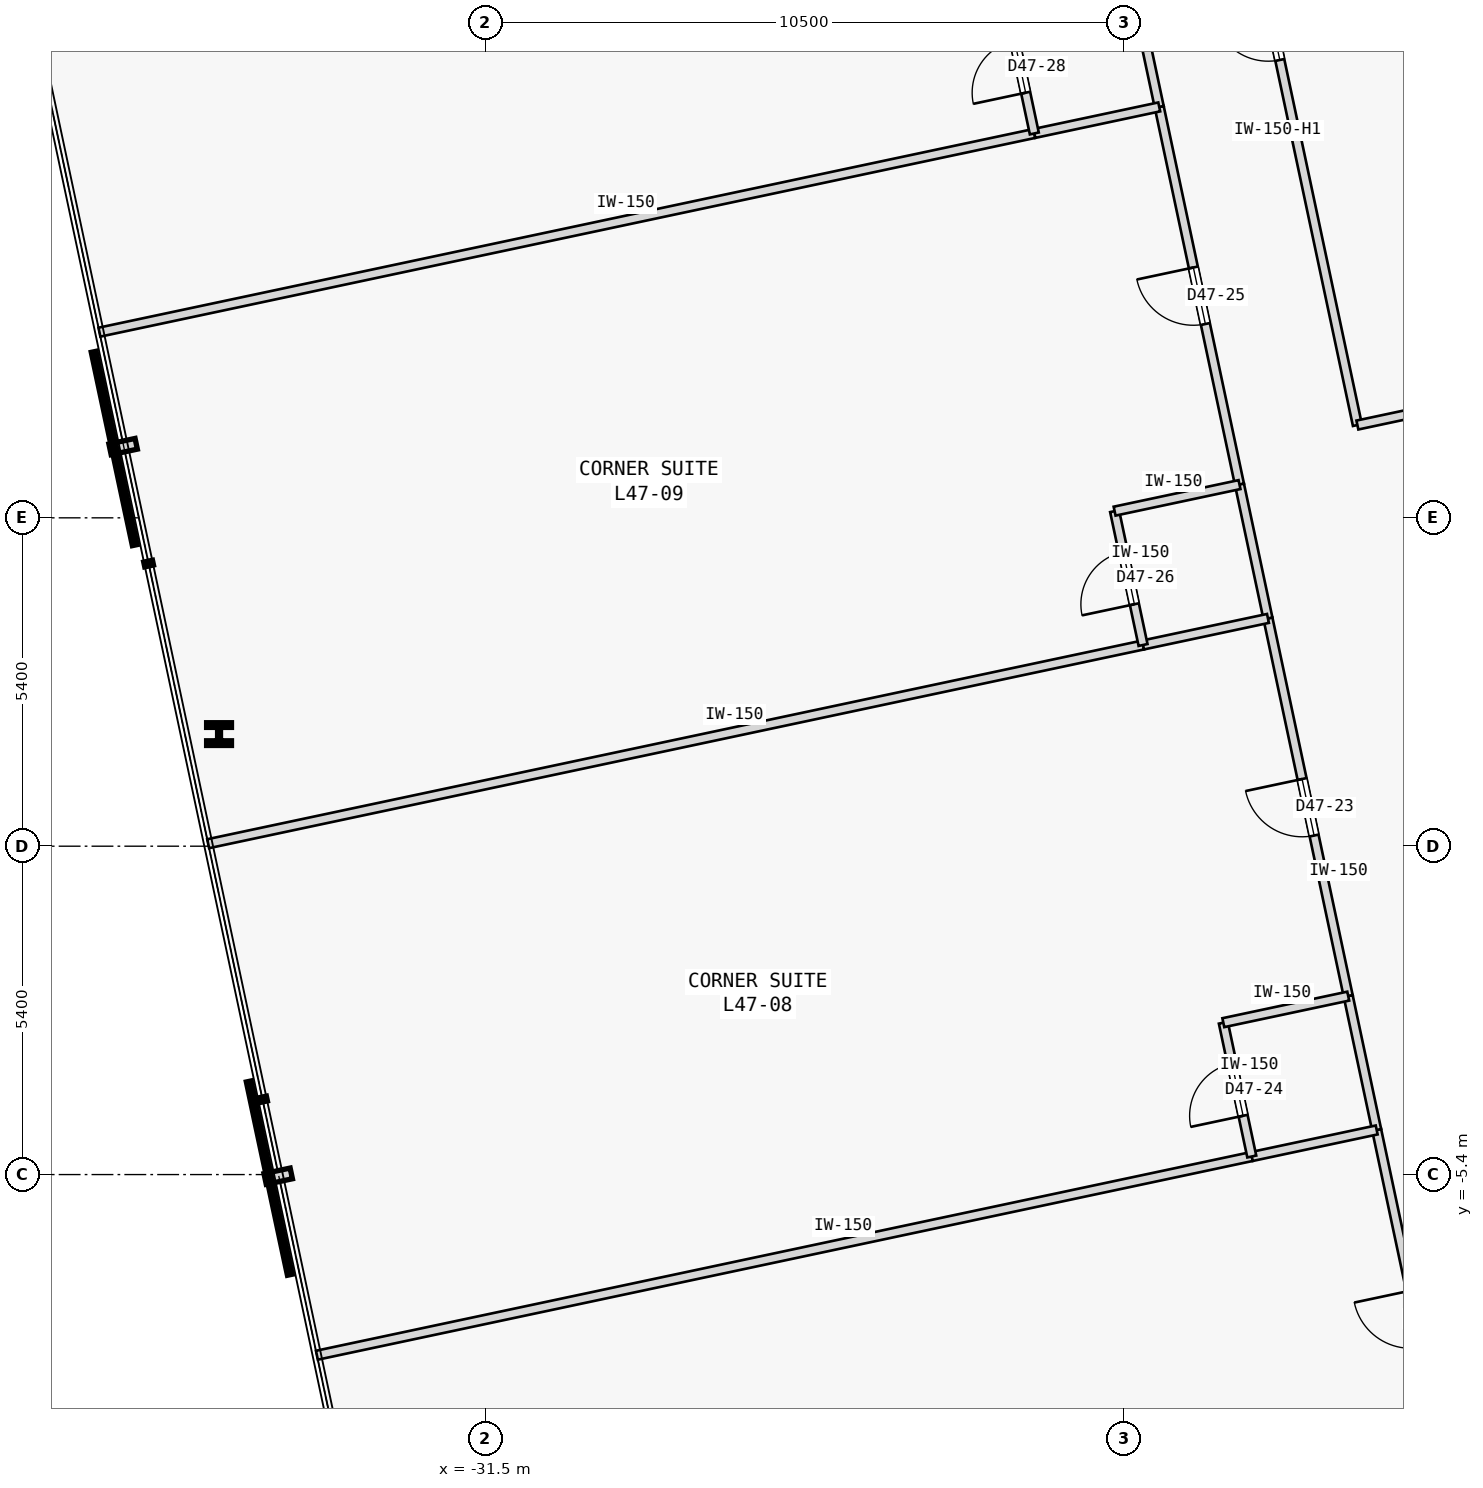
"""IFC4 building model, lengths in metres.
Left out: names, types, materials, properties, quantities, classifications, styles, units other than length and angle.
Written with IfcOpenShell. Run it as: python <this file> out.ifc"""

import sys

from ifc_helpers import new_model, si_unit, direction, frame, frame_2d, origin, origin_2d, place, context, subcontext, project, spatial, rectangle, i_section, extrude, element, fill, save


model = new_model("IFC4")
c1 = context("Model", 3, precision=1e-05, world=origin(), true_north=direction((0.0, 1.0)))
c2 = subcontext(c1, "Body", "Model", "MODEL_VIEW")
j1 = project(units=[si_unit("LENGTHUNIT", "METRE"), si_unit("PLANEANGLEUNIT", "RADIAN")], contexts=[c1])
p1 = place(None, origin())
s1 = spatial("IfcSite", under=j1, at=p1, CompositionType="ELEMENT")
p2 = place(p1, origin())
s2 = spatial("IfcBuilding", under=s1, at=p2, CompositionType="ELEMENT")
p3 = place(p2, frame((0.0, 0.0, 182.0)))
s3 = spatial("IfcBuildingStorey", under=s2, at=p3, CompositionType="ELEMENT", Elevation=182.0)
p4 = place(p3, frame((-35.883, 1.844, 0.0), z_axis=(0.0, 0.0, 1.0), x_axis=(1.0, 0.0, 0.0)))
e1 = element("IfcColumn", 1, at=p4, inside=s3, PredefinedType="COLUMN", context=c2, shape_type="SweptSolid", body=[
    extrude(i_section(OverallWidth=0.409, OverallDepth=0.374, WebThickness=0.048, FlangeThickness=0.077, FilletRadius=0.015, at=origin_2d()), origin(), (0.0, 0.0, 1.0), 3.4),
])
p5 = place(p3, frame((-17.162, 6.926, 0.0), z_axis=(0.0, 0.0, 1.0), x_axis=(-0.207911421929, 0.978147657888, 0.0)))
e2 = element("IfcWall", 2, at=p5, inside=s3, PredefinedType="PARTITIONING", context=c2, shape_type="SweptSolid", body=[
    extrude(rectangle(XDim=13.195, YDim=0.15, at=frame_2d((6.598, 0.0))), origin(), (0.0, 0.0, 1.0), 2.725),
])
p6 = place(p5, frame((6.137, 0.0, 0.0)))
e3 = element("IfcOpeningElement", 3, at=p6, cuts=e2, PredefinedType="OPENING", context=c2, shape_type="SweptSolid", body=[
    extrude(rectangle(XDim=0.92, YDim=2.15, at=frame_2d((0.46, 1.075))), frame((0.0, 0.085, 0.0), z_axis=(0.0, -1.0, 0.0), x_axis=(1.0, 0.0, 0.0)), (0.0, 0.0, 1.0), 0.17),
])
p7 = place(p3, frame((-17.162, 6.926, 0.0), z_axis=(0.0, 0.0, 1.0), x_axis=(0.978144196583, 0.207927705443, 0.0)))
e4 = element("IfcWall", 4, at=p7, inside=s3, PredefinedType="PARTITIONING", context=c2, shape_type="SweptSolid", body=[
    extrude(rectangle(XDim=5.717, YDim=0.15, at=frame_2d((2.858, 0.0))), origin(), (0.0, 0.0, 1.0), 3.175),
])
p8 = place(p3, frame((-15.525, -10.878, 0.0), z_axis=(0.0, 0.0, 1.0), x_axis=(-0.207887725283, 0.978152694459, 0.0)))
e5 = element("IfcWall", 5, at=p8, inside=s3, PredefinedType="PARTITIONING", context=c2, shape_type="SweptSolid", body=[
    extrude(rectangle(XDim=6.35, YDim=0.15, at=frame_2d((3.175, 0.0))), origin(), (0.0, 0.0, 1.0), 3.175),
])
p9 = place(p8, frame((2.7, 0.0, 0.0)))
e6 = element("IfcOpeningElement", 6, at=p9, cuts=e5, PredefinedType="OPENING", context=c2, shape_type="SweptSolid", body=[
    extrude(rectangle(XDim=0.95, YDim=2.15, at=frame_2d((0.475, 1.075))), frame((0.0, 0.085, 0.0), z_axis=(0.0, -1.0, 0.0), x_axis=(1.0, 0.0, 0.0)), (0.0, 0.0, 1.0), 0.17),
])
p10 = place(p3, frame((-17.313, -2.466, 0.0), z_axis=(0.0, 0.0, 1.0), x_axis=(-0.207916691923, 0.978146537703, 0.0)))
e7 = element("IfcWall", 7, at=p10, inside=s3, PredefinedType="PARTITIONING", context=c2, shape_type="SweptSolid", body=[
    extrude(rectangle(XDim=6.35, YDim=0.15, at=frame_2d((3.175, 0.0))), origin(), (0.0, 0.0, 1.0), 3.175),
])
p11 = place(p10, frame((2.7, 0.0, 0.0)))
e8 = element("IfcOpeningElement", 8, at=p11, cuts=e7, PredefinedType="OPENING", context=c2, shape_type="SweptSolid", body=[
    extrude(rectangle(XDim=0.95, YDim=2.15, at=frame_2d((0.475, 1.075))), frame((0.0, 0.085, 0.0), z_axis=(0.0, -1.0, 0.0), x_axis=(1.0, 0.0, 0.0)), (0.0, 0.0, 1.0), 0.17),
])
p12 = place(p3, frame((-16.845, -4.667, 0.0), z_axis=(0.0, 0.0, 1.0), x_axis=(-0.207913264065, 0.978147266328, 0.0)))
e9 = element("IfcWall", 9, at=p12, inside=s3, PredefinedType="PARTITIONING", context=c2, shape_type="SweptSolid", body=[
    extrude(rectangle(XDim=2.25, YDim=0.15, at=frame_2d((1.125, 0.0))), origin(), (0.0, 0.0, 1.0), 3.175),
])
p13 = place(p3, frame((-19.101, 5.946, 0.0), z_axis=(0.0, 0.0, 1.0), x_axis=(-0.207916691923, 0.978146537703, 0.0)))
e10 = element("IfcWall", 10, at=p13, inside=s3, PredefinedType="PARTITIONING", context=c2, shape_type="SweptSolid", body=[
    extrude(rectangle(XDim=6.35, YDim=0.15, at=frame_2d((3.175, 0.0))), origin(), (0.0, 0.0, 1.0), 3.175),
])
p14 = place(p13, frame((2.7, 0.0, 0.0)))
e11 = element("IfcOpeningElement", 11, at=p14, cuts=e10, PredefinedType="OPENING", context=c2, shape_type="SweptSolid", body=[
    extrude(rectangle(XDim=0.95, YDim=2.15, at=frame_2d((0.475, 1.075))), frame((0.0, 0.085, 0.0), z_axis=(0.0, -1.0, 0.0), x_axis=(1.0, 0.0, 0.0)), (0.0, 0.0, 1.0), 0.17),
])
for number, where, z_axis, x_axis in (
    (12, (-18.633, 3.746, 0.0), (0.0, 0.0, 1.0), (-0.208, 0.978, 0.0)),
    (13, (-20.421, 12.158, 0.0), (0.0, 0.0, 1.0), (-0.208, 0.978, 0.0)),
):
    element("IfcWall", number, at=place(p3, frame(where, z_axis=z_axis, x_axis=x_axis)), inside=s3, PredefinedType="PARTITIONING", context=c2, shape_type="SweptSolid", body=[
        extrude(rectangle(XDim=2.25, YDim=0.15, at=frame_2d((1.125, 0.0))), origin(), (0.0, 0.0, 1.0), 3.175),
    ])
p15 = place(p3, frame((-34.274, -8.371, 0.0), z_axis=(0.0, 0.0, 1.0), x_axis=(0.978146137903, 0.207918572776, 0.0)))
e14 = element("IfcWall", 14, at=p15, inside=s3, PredefinedType="PARTITIONING", context=c2, shape_type="SweptSolid", body=[
    extrude(rectangle(XDim=15.718, YDim=0.15, at=frame_2d((7.859, 0.0))), origin(), (0.0, 0.0, 1.0), 3.175),
])
p16 = place(p3, frame((-18.899, -5.103, 0.0), z_axis=(0.0, 0.0, 1.0), x_axis=(0.97815826, 0.207861536591, 0.0)))
e15 = element("IfcWall", 15, at=p16, inside=s3, PredefinedType="PARTITIONING", context=c2, shape_type="SweptSolid", body=[
    extrude(rectangle(XDim=2.1, YDim=0.15, at=frame_2d((1.05, 0.0))), origin(), (0.0, 0.0, 1.0), 3.175),
])
p17 = place(p3, frame((-18.899, -5.103, 0.0), z_axis=(0.0, 0.0, 1.0), x_axis=(-0.207913264065, 0.978147266328, 0.0)))
e16 = element("IfcWall", 16, at=p17, inside=s3, PredefinedType="PARTITIONING", context=c2, shape_type="SweptSolid", body=[
    extrude(rectangle(XDim=2.25, YDim=0.15, at=frame_2d((1.125, 0.0))), origin(), (0.0, 0.0, 1.0), 3.175),
])
p18 = place(p17, frame((0.685, 0.0, 0.0)))
e17 = element("IfcOpeningElement", 17, at=p18, cuts=e16, PredefinedType="OPENING", context=c2, shape_type="SweptSolid", body=[
    extrude(rectangle(XDim=0.88, YDim=2.15, at=frame_2d((0.44, 1.075))), frame((0.0, 0.085, 0.0), z_axis=(0.0, -1.0, 0.0), x_axis=(1.0, 0.0, 0.0)), (0.0, 0.0, 1.0), 0.17),
])
p19 = place(p3, frame((-19.367, -2.902, 0.0), z_axis=(0.0, 0.0, 1.0), x_axis=(0.97815826, 0.207861536591, 0.0)))
e18 = element("IfcWall", 18, at=p19, inside=s3, PredefinedType="PARTITIONING", context=c2, shape_type="SweptSolid", body=[
    extrude(rectangle(XDim=2.1, YDim=0.15, at=frame_2d((1.05, 0.0))), origin(), (0.0, 0.0, 1.0), 3.175),
])
p20 = place(p3, frame((-36.062, 0.041, 0.0), z_axis=(0.0, 0.0, 1.0), x_axis=(0.978149296727, 0.207903711638, 0.0)))
e19 = element("IfcWall", 19, at=p20, inside=s3, PredefinedType="PARTITIONING", context=c2, shape_type="SweptSolid", body=[
    extrude(rectangle(XDim=15.718, YDim=0.15, at=frame_2d((7.859, 0.0))), origin(), (0.0, 0.0, 1.0), 3.175),
])
p21 = place(p3, frame((-20.688, 3.309, 0.0), z_axis=(0.0, 0.0, 1.0), x_axis=(0.978134617382, 0.207972763311, 0.0)))
e20 = element("IfcWall", 20, at=p21, inside=s3, PredefinedType="PARTITIONING", context=c2, shape_type="SweptSolid", body=[
    extrude(rectangle(XDim=2.1, YDim=0.15, at=frame_2d((1.05, 0.0))), origin(), (0.0, 0.0, 1.0), 3.175),
])
p22 = place(p3, frame((-20.688, 3.309, 0.0), z_axis=(0.0, 0.0, 1.0), x_axis=(-0.207891197838, 0.978151956427, 0.0)))
e21 = element("IfcWall", 21, at=p22, inside=s3, PredefinedType="PARTITIONING", context=c2, shape_type="SweptSolid", body=[
    extrude(rectangle(XDim=2.25, YDim=0.15, at=frame_2d((1.125, 0.0))), origin(), (0.0, 0.0, 1.0), 3.175),
])
p23 = place(p22, frame((0.685, 0.0, 0.0)))
e22 = element("IfcOpeningElement", 22, at=p23, cuts=e21, PredefinedType="OPENING", context=c2, shape_type="SweptSolid", body=[
    extrude(rectangle(XDim=0.88, YDim=2.15, at=frame_2d((0.44, 1.075))), frame((0.0, 0.085, 0.0), z_axis=(0.0, -1.0, 0.0), x_axis=(1.0, 0.0, 0.0)), (0.0, 0.0, 1.0), 0.17),
])
p24 = place(p3, frame((-21.155, 5.51, 0.0), z_axis=(0.0, 0.0, 1.0), x_axis=(0.97815826, 0.207861536591, 0.0)))
e23 = element("IfcWall", 23, at=p24, inside=s3, PredefinedType="PARTITIONING", context=c2, shape_type="SweptSolid", body=[
    extrude(rectangle(XDim=2.1, YDim=0.15, at=frame_2d((1.05, 0.0))), origin(), (0.0, 0.0, 1.0), 3.175),
])
p25 = place(p3, frame((-37.85, 8.453, 0.0), z_axis=(0.0, 0.0, 1.0), x_axis=(0.978149296727, 0.207903711638, 0.0)))
e24 = element("IfcWall", 24, at=p25, inside=s3, PredefinedType="PARTITIONING", context=c2, shape_type="SweptSolid", body=[
    extrude(rectangle(XDim=15.718, YDim=0.15, at=frame_2d((7.859, 0.0))), origin(), (0.0, 0.0, 1.0), 3.175),
])
p26 = place(p3, frame((-22.476, 11.721, 0.0), z_axis=(0.0, 0.0, 1.0), x_axis=(0.978134617382, 0.207972763311, 0.0)))
e25 = element("IfcWall", 25, at=p26, inside=s3, PredefinedType="PARTITIONING", context=c2, shape_type="SweptSolid", body=[
    extrude(rectangle(XDim=2.1, YDim=0.15, at=frame_2d((1.05, 0.0))), origin(), (0.0, 0.0, 1.0), 3.175),
])
p27 = place(p3, frame((-22.476, 11.721, 0.0), z_axis=(0.0, 0.0, 1.0), x_axis=(-0.207891197838, 0.978151956427, 0.0)))
e26 = element("IfcWall", 26, at=p27, inside=s3, PredefinedType="PARTITIONING", context=c2, shape_type="SweptSolid", body=[
    extrude(rectangle(XDim=2.25, YDim=0.15, at=frame_2d((1.125, 0.0))), origin(), (0.0, 0.0, 1.0), 3.175),
])
p28 = place(p27, frame((0.685, 0.0, 0.0)))
e27 = element("IfcOpeningElement", 27, at=p28, cuts=e26, PredefinedType="OPENING", context=c2, shape_type="SweptSolid", body=[
    extrude(rectangle(XDim=0.88, YDim=2.15, at=frame_2d((0.44, 1.075))), frame((0.0, 0.085, 0.0), z_axis=(0.0, -1.0, 0.0), x_axis=(1.0, 0.0, 0.0)), (0.0, 0.0, 1.0), 0.17),
])
p29 = place(p6, origin())
e28 = element("IfcDoor", 28, at=p29, inside=s3, OperationType="SINGLE_SWING_RIGHT", PredefinedType="DOOR", context=c2, shape_type="SweptSolid", body=[
    extrude(rectangle(XDim=0.92, YDim=2.15, at=frame_2d((0.46, 1.075))), frame((0.0, 0.025, 0.0), z_axis=(0.0, -1.0, 0.0), x_axis=(1.0, 0.0, 0.0)), (0.0, 0.0, 1.0), 0.05),
])
fill(e3, e28)
p30 = place(p11, origin())
e29 = element("IfcDoor", 29, at=p30, inside=s3, OperationType="SINGLE_SWING_RIGHT", PredefinedType="DOOR", context=c2, shape_type="SweptSolid", body=[
    extrude(rectangle(XDim=0.95, YDim=2.15, at=frame_2d((0.475, 1.075))), frame((0.0, 0.025, 0.0), z_axis=(0.0, -1.0, 0.0), x_axis=(1.0, 0.0, 0.0)), (0.0, 0.0, 1.0), 0.05),
])
fill(e8, e29)
p31 = place(p18, origin())
e30 = element("IfcDoor", 30, at=p31, inside=s3, OperationType="SINGLE_SWING_LEFT", PredefinedType="DOOR", context=c2, shape_type="SweptSolid", body=[
    extrude(rectangle(XDim=0.88, YDim=2.15, at=frame_2d((0.44, 1.075))), frame((0.0, 0.025, 0.0), z_axis=(0.0, -1.0, 0.0), x_axis=(1.0, 0.0, 0.0)), (0.0, 0.0, 1.0), 0.05),
])
fill(e17, e30)
p32 = place(p14, origin())
e31 = element("IfcDoor", 31, at=p32, inside=s3, OperationType="SINGLE_SWING_RIGHT", PredefinedType="DOOR", context=c2, shape_type="SweptSolid", body=[
    extrude(rectangle(XDim=0.95, YDim=2.15, at=frame_2d((0.475, 1.075))), frame((0.0, 0.025, 0.0), z_axis=(0.0, -1.0, 0.0), x_axis=(1.0, 0.0, 0.0)), (0.0, 0.0, 1.0), 0.05),
])
fill(e11, e31)
p33 = place(p23, origin())
e32 = element("IfcDoor", 32, at=p33, inside=s3, OperationType="SINGLE_SWING_LEFT", PredefinedType="DOOR", context=c2, shape_type="SweptSolid", body=[
    extrude(rectangle(XDim=0.88, YDim=2.15, at=frame_2d((0.44, 1.075))), frame((0.0, 0.025, 0.0), z_axis=(0.0, -1.0, 0.0), x_axis=(1.0, 0.0, 0.0)), (0.0, 0.0, 1.0), 0.05),
])
fill(e22, e32)
p34 = place(p28, origin())
e33 = element("IfcDoor", 33, at=p34, inside=s3, OperationType="SINGLE_SWING_LEFT", PredefinedType="DOOR", context=c2, shape_type="SweptSolid", body=[
    extrude(rectangle(XDim=0.88, YDim=2.15, at=frame_2d((0.44, 1.075))), frame((0.0, 0.025, 0.0), z_axis=(0.0, -1.0, 0.0), x_axis=(1.0, 0.0, 0.0)), (0.0, 0.0, 1.0), 0.05),
])
fill(e27, e33)
save(model, sys.argv[1])
